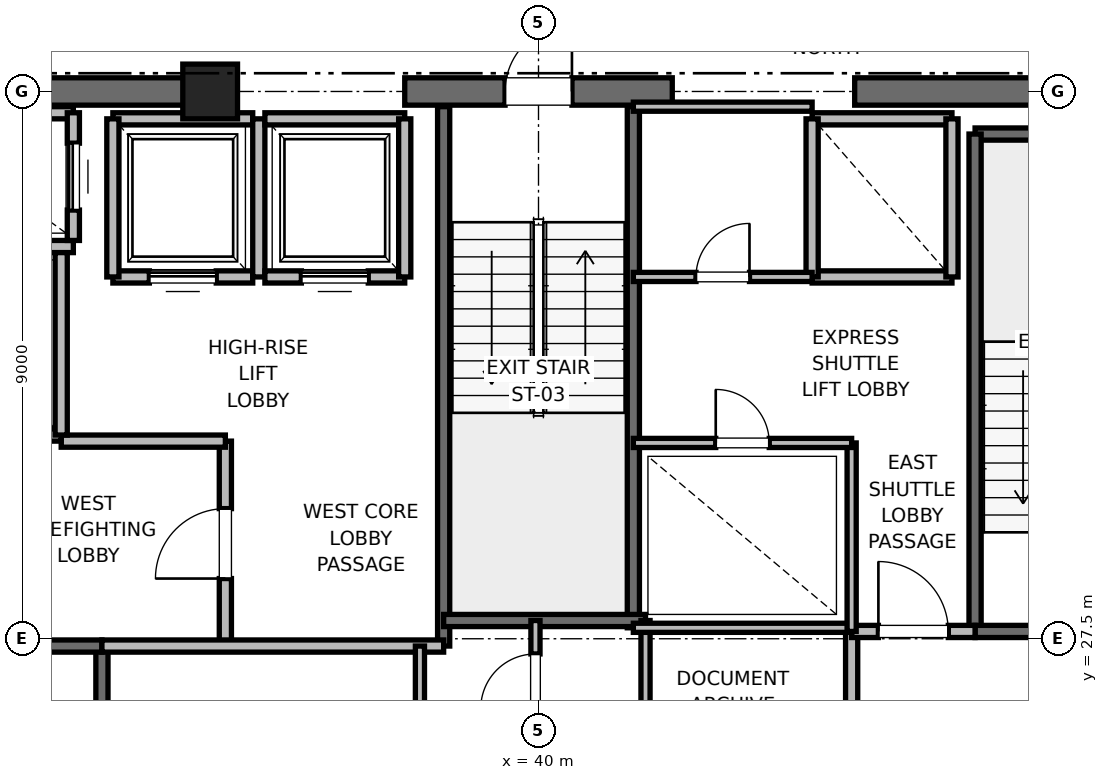
"""IFC4 building model, lengths in metres.
Left out: names, types, materials, properties, quantities, classifications, styles, units other than length and angle.
Written with IfcOpenShell. Run it as: python <this file> out.ifc"""

import sys

from ifc_helpers import new_model, si_unit, direction, frame, frame_2d, origin, origin_2d, place, context, subcontext, project, spatial, rectangle, extrude, element, fill, save


model = new_model("IFC4")
c1 = context("Model", 3, precision=1e-05, world=origin(), true_north=direction((0.0, 1.0)))
c2 = subcontext(c1, "Body", "Model", "MODEL_VIEW")
j1 = project(units=[si_unit("LENGTHUNIT", "METRE"), si_unit("PLANEANGLEUNIT", "RADIAN")], contexts=[c1])
p1 = place(None, origin())
s1 = spatial("IfcSite", under=j1, at=p1, CompositionType="ELEMENT")
p2 = place(p1, origin())
s2 = spatial("IfcBuilding", under=s1, at=p2, CompositionType="ELEMENT")
p3 = place(p2, frame((0.0, 0.0, 251.2)))
s3 = spatial("IfcBuildingStorey", under=s2, at=p3, CompositionType="ELEMENT", Elevation=251.2)
p4 = place(p3, frame((34.6, 36.5, 0.0), z_axis=(0.0, 0.0, 1.0), x_axis=(1.0, 0.0, 0.0)))
e1 = element("IfcColumn", 1, at=p4, inside=s3, PredefinedType="PILASTER", context=c2, shape_type="SweptSolid", body=[
    extrude(rectangle(XDim=0.9, YDim=0.9, at=origin_2d()), origin(), (0.0, 0.0, 1.0), 4.0),
])
p5 = place(p3, frame((29.0, 36.5, 0.0), z_axis=(0.0, 0.0, 1.0), x_axis=(1.0, 0.0, 0.0)))
e2 = element("IfcWall", 2, at=p5, inside=s3, PredefinedType="SHEAR", context=c2, shape_type="SweptSolid", body=[
    extrude(rectangle(XDim=5.8, YDim=0.45, at=frame_2d((2.9, 0.0))), origin(), (0.0, 0.0, 1.0), 3.785),
])
p6 = place(p3, frame((37.8, 36.5, 0.0), z_axis=(0.0, 0.0, 1.0), x_axis=(1.0, 0.0, 0.0)))
e3 = element("IfcWall", 3, at=p6, inside=s3, PredefinedType="SHEAR", context=c2, shape_type="SweptSolid", body=[
    extrude(rectangle(XDim=4.4, YDim=0.45, at=frame_2d((2.2, 0.0))), origin(), (0.0, 0.0, 1.0), 3.785),
])
p7 = place(p6, frame((1.65, 0.0, 0.0)))
e4 = element("IfcOpeningElement", 4, at=p7, cuts=e3, PredefinedType="OPENING", context=c2, shape_type="SweptSolid", body=[
    extrude(rectangle(XDim=1.1, YDim=2.15, at=frame_2d((0.55, 1.075))), frame((0.0, 0.225, 0.0), z_axis=(0.0, -1.0, 0.0), x_axis=(1.0, 0.0, 0.0)), (0.0, 0.0, 1.0), 0.45),
])
p8 = place(p3, frame((45.2, 36.5, 0.0), z_axis=(0.0, 0.0, 1.0), x_axis=(1.0, 0.0, 0.0)))
e5 = element("IfcWall", 5, at=p8, inside=s3, PredefinedType="SHEAR", context=c2, shape_type="SweptSolid", body=[
    extrude(rectangle(XDim=5.8, YDim=0.45, at=frame_2d((2.9, 0.0))), origin(), (0.0, 0.0, 1.0), 3.785),
])
p9 = place(p3, frame((32.82, 18.6, 0.0), z_axis=(0.0, 0.0, 1.0), x_axis=(0.0, 1.0, 0.0)))
e6 = element("IfcWall", 6, at=p9, inside=s3, PredefinedType="SOLIDWALL", context=c2, shape_type="SweptSolid", body=[
    extrude(rectangle(XDim=8.78, YDim=0.2, at=frame_2d((4.39, 0.0))), origin(), (0.0, 0.0, 1.0), 3.785),
])
p10 = place(p3, frame((29.7, 27.38, 0.0), z_axis=(0.0, 0.0, 1.0), x_axis=(1.0, 0.0, 0.0)))
e7 = element("IfcWall", 7, at=p10, inside=s3, PredefinedType="SOLIDWALL", context=c2, shape_type="SweptSolid", body=[
    extrude(rectangle(XDim=3.12, YDim=0.2, at=frame_2d((1.56, 0.0))), origin(), (0.0, 0.0, 1.0), 3.785),
])
p11 = place(p10, frame((1.01, 0.0, 0.0)))
e8 = element("IfcOpeningElement", 8, at=p11, cuts=e7, PredefinedType="OPENING", context=c2, shape_type="SweptSolid", body=[
    extrude(rectangle(XDim=1.1, YDim=2.15, at=frame_2d((0.55, 1.075))), frame((0.0, 0.1, 0.0), z_axis=(0.0, -1.0, 0.0), x_axis=(1.0, 0.0, 0.0)), (0.0, 0.0, 1.0), 0.2),
])
p12 = place(p3, frame((47.18, 35.8, 0.0), z_axis=(0.0, 0.0, 1.0), x_axis=(1.0, 0.0, 0.0)))
e9 = element("IfcWall", 9, at=p12, inside=s3, PredefinedType="SOLIDWALL", context=c2, shape_type="SweptSolid", body=[
    extrude(rectangle(XDim=3.12, YDim=0.2, at=frame_2d((1.56, 0.0))), origin(), (0.0, 0.0, 1.0), 3.785),
])
p13 = place(p3, frame((47.18, 27.62, 0.0), z_axis=(0.0, 0.0, 1.0), x_axis=(0.0, 1.0, 0.0)))
e10 = element("IfcWall", 10, at=p13, inside=s3, PredefinedType="SOLIDWALL", context=c2, shape_type="SweptSolid", body=[
    extrude(rectangle(XDim=8.18, YDim=0.2, at=frame_2d((4.09, 0.0))), origin(), (0.0, 0.0, 1.0), 3.785),
])
p14 = place(p3, frame((47.18, 27.62, 0.0), z_axis=(0.0, 0.0, 1.0), x_axis=(1.0, 0.0, 0.0)))
e11 = element("IfcWall", 11, at=p14, inside=s3, PredefinedType="SOLIDWALL", context=c2, shape_type="SweptSolid", body=[
    extrude(rectangle(XDim=3.12, YDim=0.2, at=frame_2d((1.56, 0.0))), origin(), (0.0, 0.0, 1.0), 3.785),
])
p15 = place(p14, frame((1.01, 0.0, 0.0)))
e12 = element("IfcOpeningElement", 12, at=p15, cuts=e11, PredefinedType="OPENING", context=c2, shape_type="SweptSolid", body=[
    extrude(rectangle(XDim=1.1, YDim=2.15, at=frame_2d((0.55, 1.075))), frame((0.0, 0.1, 0.0), z_axis=(0.0, -1.0, 0.0), x_axis=(1.0, 0.0, 0.0)), (0.0, 0.0, 1.0), 0.2),
])
p16 = place(p3, frame((38.44, 27.38, 0.0), z_axis=(0.0, 0.0, 1.0), x_axis=(0.0, 1.0, 0.0)))
e13 = element("IfcWall", 13, at=p16, inside=s3, PredefinedType="SOLIDWALL", context=c2, shape_type="SweptSolid", body=[
    extrude(rectangle(XDim=8.87, YDim=0.2, at=frame_2d((4.435, 0.0))), origin(), (0.0, 0.0, 1.0), 3.785),
])
p17 = place(p3, frame((41.56, 27.68, 0.0), z_axis=(0.0, 0.0, 1.0), x_axis=(0.0, 1.0, 0.0)))
e14 = element("IfcWall", 14, at=p17, inside=s3, PredefinedType="SOLIDWALL", context=c2, shape_type="SweptSolid", body=[
    extrude(rectangle(XDim=8.57, YDim=0.2, at=frame_2d((4.285, 0.0))), origin(), (0.0, 0.0, 1.0), 3.785),
])
p18 = place(p3, frame((38.44, 27.8, 0.0), z_axis=(0.0, 0.0, 1.0), x_axis=(1.0, 0.0, 0.0)))
e15 = element("IfcWall", 15, at=p18, inside=s3, PredefinedType="SOLIDWALL", context=c2, shape_type="SweptSolid", body=[
    extrude(rectangle(XDim=3.32, YDim=0.2, at=frame_2d((1.66, 0.0))), origin(), (0.0, 0.0, 1.0), 3.785),
])
p19 = place(p3, frame((34.85, 27.38, 0.0), z_axis=(0.0, 0.0, 1.0), x_axis=(0.0, 1.0, 0.0)))
e16 = element("IfcWall", 16, at=p19, inside=s3, PredefinedType="PARTITIONING", context=c2, shape_type="SweptSolid", body=[
    extrude(rectangle(XDim=3.37, YDim=0.2, at=frame_2d((1.685, 0.0))), origin(), (0.0, 0.0, 1.0), 3.785),
])
p20 = place(p19, frame((1.11, 0.0, 0.0)))
e17 = element("IfcOpeningElement", 17, at=p20, cuts=e16, PredefinedType="OPENING", context=c2, shape_type="SweptSolid", body=[
    extrude(rectangle(XDim=1.15, YDim=2.2, at=frame_2d((0.575, 1.1))), frame((0.0, 0.1, 0.0), z_axis=(0.0, -1.0, 0.0), x_axis=(1.0, 0.0, 0.0)), (0.0, 0.0, 1.0), 0.2),
])
p21 = place(p3, frame((32.82, 27.38, 0.0), z_axis=(0.0, 0.0, 1.0), x_axis=(1.0, 0.0, 0.0)))
e18 = element("IfcWall", 18, at=p21, inside=s3, PredefinedType="PARTITIONING", context=c2, shape_type="SweptSolid", body=[
    extrude(rectangle(XDim=5.62, YDim=0.2, at=frame_2d((2.81, 0.0))), origin(), (0.0, 0.0, 1.0), 3.785),
])
p22 = place(p3, frame((32.15, 30.75, 0.0), z_axis=(0.0, 0.0, 1.0), x_axis=(1.0, 0.0, 0.0)))
e19 = element("IfcWall", 19, at=p22, inside=s3, PredefinedType="PARTITIONING", context=c2, shape_type="SweptSolid", body=[
    extrude(rectangle(XDim=2.7, YDim=0.2, at=frame_2d((1.35, 0.0))), origin(), (0.0, 0.0, 1.0), 3.785),
])
p23 = place(p3, frame((45.15, 24.25, 0.0), z_axis=(0.0, 0.0, 1.0), x_axis=(0.0, 1.0, 0.0)))
e20 = element("IfcWall", 20, at=p23, inside=s3, PredefinedType="PARTITIONING", context=c2, shape_type="SweptSolid", body=[
    extrude(rectangle(XDim=3.37, YDim=0.2, at=frame_2d((1.685, 0.0))), origin(), (0.0, 0.0, 1.0), 3.785),
])
p24 = place(p3, frame((45.15, 27.62, 0.0), z_axis=(0.0, 0.0, 1.0), x_axis=(1.0, 0.0, 0.0)))
e21 = element("IfcWall", 21, at=p24, inside=s3, PredefinedType="PARTITIONING", context=c2, shape_type="SweptSolid", body=[
    extrude(rectangle(XDim=2.03, YDim=0.2, at=frame_2d((1.015, 0.0))), origin(), (0.0, 0.0, 1.0), 3.785),
])
p25 = place(p24, frame((0.44, 0.0, 0.0)))
e22 = element("IfcOpeningElement", 22, at=p25, cuts=e21, PredefinedType="OPENING", context=c2, shape_type="SweptSolid", body=[
    extrude(rectangle(XDim=1.15, YDim=2.2, at=frame_2d((0.575, 1.1))), frame((0.0, 0.1, 0.0), z_axis=(0.0, -1.0, 0.0), x_axis=(1.0, 0.0, 0.0)), (0.0, 0.0, 1.0), 0.2),
])
p26 = place(p3, frame((29.55, 30.85, 0.0), z_axis=(0.0, 0.0, 1.0), x_axis=(1.0, 0.0, 0.0)))
e23 = element("IfcWall", 23, at=p26, inside=s3, PredefinedType="SOLIDWALL", context=c2, shape_type="SweptSolid", body=[
    extrude(rectangle(XDim=2.6, YDim=0.2, at=frame_2d((1.3, 0.0))), origin(), (0.0, 0.0, 1.0), 2.865),
])
p27 = place(p26, frame((0.75, 0.0, 0.0)))
e24 = element("IfcOpeningElement", 24, at=p27, cuts=e23, PredefinedType="OPENING", context=c2, shape_type="SweptSolid", body=[
    extrude(rectangle(XDim=1.1, YDim=2.2, at=frame_2d((0.55, 1.1))), frame((0.0, 0.1, 0.0), z_axis=(0.0, -1.0, 0.0), x_axis=(1.0, 0.0, 0.0)), (0.0, 0.0, 1.0), 0.2),
])
p28 = place(p3, frame((29.55, 33.95, 0.0), z_axis=(0.0, 0.0, 1.0), x_axis=(1.0, 0.0, 0.0)))
e25 = element("IfcWall", 25, at=p28, inside=s3, PredefinedType="SOLIDWALL", context=c2, shape_type="SweptSolid", body=[
    extrude(rectangle(XDim=2.8, YDim=0.2, at=frame_2d((1.4, 0.0))), origin(), (0.0, 0.0, 1.0), 3.785),
])
p29 = place(p3, frame((32.15, 30.85, 0.0), z_axis=(0.0, 0.0, 1.0), x_axis=(0.0, 1.0, 0.0)))
e26 = element("IfcWall", 26, at=p29, inside=s3, PredefinedType="SOLIDWALL", context=c2, shape_type="SweptSolid", body=[
    extrude(rectangle(XDim=3.0, YDim=0.2, at=frame_2d((1.5, 0.0))), origin(), (0.0, 0.0, 1.0), 3.785),
])
p30 = place(p3, frame((32.35, 36.15, 0.0), z_axis=(0.0, 0.0, 1.0), x_axis=(-1.0, 0.0, 0.0)))
e27 = element("IfcWall", 27, at=p30, inside=s3, PredefinedType="SOLIDWALL", context=c2, shape_type="SweptSolid", body=[
    extrude(rectangle(XDim=2.8, YDim=0.2, at=frame_2d((1.4, 0.0))), origin(), (0.0, 0.0, 1.0), 3.148),
])
p31 = place(p3, frame((32.35, 34.05, 0.0), z_axis=(0.0, 0.0, 1.0), x_axis=(0.0, 1.0, 0.0)))
e28 = element("IfcWall", 28, at=p31, inside=s3, PredefinedType="SOLIDWALL", context=c2, shape_type="SweptSolid", body=[
    extrude(rectangle(XDim=2.1, YDim=0.2, at=frame_2d((1.05, 0.0))), origin(), (0.0, 0.0, 1.0), 3.785),
])
p32 = place(p31, frame((0.5, 0.0, 0.0)))
e29 = element("IfcOpeningElement", 29, at=p32, cuts=e28, PredefinedType="OPENING", context=c2, shape_type="SweptSolid", body=[
    extrude(rectangle(XDim=1.1, YDim=2.2, at=frame_2d((0.55, 1.1))), frame((0.0, 0.1, 0.0), z_axis=(0.0, -1.0, 0.0), x_axis=(1.0, 0.0, 0.0)), (0.0, 0.0, 1.0), 0.2),
])
p33 = place(p3, frame((33.0, 33.45, 0.0), z_axis=(0.0, 0.0, 1.0), x_axis=(1.0, 0.0, 0.0)))
e30 = element("IfcWall", 30, at=p33, inside=s3, PredefinedType="SOLIDWALL", context=c2, shape_type="SweptSolid", body=[
    extrude(rectangle(XDim=2.3, YDim=0.2, at=frame_2d((1.15, 0.0))), origin(), (0.0, 0.0, 1.0), 3.785),
])
p34 = place(p33, frame((0.6, 0.0, 0.0)))
e31 = element("IfcOpeningElement", 31, at=p34, cuts=e30, PredefinedType="OPENING", context=c2, shape_type="SweptSolid", body=[
    extrude(rectangle(XDim=1.1, YDim=2.2, at=frame_2d((0.55, 1.1))), frame((0.0, 0.1, 0.0), z_axis=(0.0, -1.0, 0.0), x_axis=(1.0, 0.0, 0.0)), (0.0, 0.0, 1.0), 0.2),
])
p35 = place(p3, frame((35.3, 36.05, 0.0), z_axis=(0.0, 0.0, 1.0), x_axis=(-1.0, 0.0, 0.0)))
e32 = element("IfcWall", 32, at=p35, inside=s3, PredefinedType="SOLIDWALL", context=c2, shape_type="SweptSolid", body=[
    extrude(rectangle(XDim=2.3, YDim=0.2, at=frame_2d((1.15, 0.0))), origin(), (0.0, 0.0, 1.0), 2.865),
])
p36 = place(p3, frame((33.0, 36.05, 0.0), z_axis=(0.0, 0.0, 1.0), x_axis=(0.0, -1.0, 0.0)))
e33 = element("IfcWall", 33, at=p36, inside=s3, PredefinedType="SOLIDWALL", context=c2, shape_type="SweptSolid", body=[
    extrude(rectangle(XDim=2.6, YDim=0.2, at=frame_2d((1.3, 0.0))), origin(), (0.0, 0.0, 1.0), 3.785),
])
p37 = place(p3, frame((35.4, 33.45, 0.0), z_axis=(0.0, 0.0, 1.0), x_axis=(0.0, 1.0, 0.0)))
e34 = element("IfcWall", 34, at=p37, inside=s3, PredefinedType="SOLIDWALL", context=c2, shape_type="SweptSolid", body=[
    extrude(rectangle(XDim=2.6, YDim=0.2, at=frame_2d((1.3, 0.0))), origin(), (0.0, 0.0, 1.0), 2.865),
])
p38 = place(p3, frame((35.5, 33.45, 0.0), z_axis=(0.0, 0.0, 1.0), x_axis=(1.0, 0.0, 0.0)))
e35 = element("IfcWall", 35, at=p38, inside=s3, PredefinedType="SOLIDWALL", context=c2, shape_type="SweptSolid", body=[
    extrude(rectangle(XDim=2.3, YDim=0.2, at=frame_2d((1.15, 0.0))), origin(), (0.0, 0.0, 1.0), 3.785),
])
p39 = place(p38, frame((0.6, 0.0, 0.0)))
e36 = element("IfcOpeningElement", 36, at=p39, cuts=e35, PredefinedType="OPENING", context=c2, shape_type="SweptSolid", body=[
    extrude(rectangle(XDim=1.1, YDim=2.2, at=frame_2d((0.55, 1.1))), frame((0.0, 0.1, 0.0), z_axis=(0.0, -1.0, 0.0), x_axis=(1.0, 0.0, 0.0)), (0.0, 0.0, 1.0), 0.2),
])
p40 = place(p3, frame((37.8, 36.05, 0.0), z_axis=(0.0, 0.0, 1.0), x_axis=(-1.0, 0.0, 0.0)))
e37 = element("IfcWall", 37, at=p40, inside=s3, PredefinedType="SOLIDWALL", context=c2, shape_type="SweptSolid", body=[
    extrude(rectangle(XDim=2.3, YDim=0.2, at=frame_2d((1.15, 0.0))), origin(), (0.0, 0.0, 1.0), 2.865),
])
p41 = place(p3, frame((37.8, 33.45, 0.0), z_axis=(0.0, 0.0, 1.0), x_axis=(0.0, 1.0, 0.0)))
e38 = element("IfcWall", 38, at=p41, inside=s3, PredefinedType="SOLIDWALL", context=c2, shape_type="SweptSolid", body=[
    extrude(rectangle(XDim=2.6, YDim=0.2, at=frame_2d((1.3, 0.0))), origin(), (0.0, 0.0, 1.0), 2.865),
])
p42 = place(p3, frame((44.5, 33.45, 0.0), z_axis=(0.0, 0.0, 1.0), x_axis=(1.0, 0.0, 0.0)))
e39 = element("IfcWall", 39, at=p42, inside=s3, PredefinedType="SOLIDWALL", context=c2, shape_type="SweptSolid", body=[
    extrude(rectangle(XDim=2.3, YDim=0.2, at=frame_2d((1.15, 0.0))), origin(), (0.0, 0.0, 1.0), 3.785),
])
p43 = place(p3, frame((46.8, 36.05, 0.0), z_axis=(0.0, 0.0, 1.0), x_axis=(-1.0, 0.0, 0.0)))
e40 = element("IfcWall", 40, at=p43, inside=s3, PredefinedType="SOLIDWALL", context=c2, shape_type="SweptSolid", body=[
    extrude(rectangle(XDim=2.3, YDim=0.2, at=frame_2d((1.15, 0.0))), origin(), (0.0, 0.0, 1.0), 2.865),
])
p44 = place(p3, frame((44.5, 36.05, 0.0), z_axis=(0.0, 0.0, 1.0), x_axis=(0.0, -1.0, 0.0)))
e41 = element("IfcWall", 41, at=p44, inside=s3, PredefinedType="SOLIDWALL", context=c2, shape_type="SweptSolid", body=[
    extrude(rectangle(XDim=2.6, YDim=0.2, at=frame_2d((1.3, 0.0))), origin(), (0.0, 0.0, 1.0), 2.865),
])
p45 = place(p3, frame((46.8, 33.45, 0.0), z_axis=(0.0, 0.0, 1.0), x_axis=(0.0, 1.0, 0.0)))
e42 = element("IfcWall", 42, at=p45, inside=s3, PredefinedType="SOLIDWALL", context=c2, shape_type="SweptSolid", body=[
    extrude(rectangle(XDim=2.6, YDim=0.2, at=frame_2d((1.3, 0.0))), origin(), (0.0, 0.0, 1.0), 3.785),
])
p46 = place(p3, frame((41.76, 23.8, 0.0), z_axis=(0.0, 0.0, 1.0), x_axis=(0.0, 1.0, 0.0)))
e43 = element("IfcWall", 43, at=p46, inside=s3, PredefinedType="PARTITIONING", context=c2, shape_type="SweptSolid", body=[
    extrude(rectangle(XDim=4.0, YDim=0.15, at=frame_2d((2.0, 0.0))), origin(), (0.0, 0.0, 1.0), 2.85),
])
p47 = place(p3, frame((39.95, 25.8, 0.0), z_axis=(0.0, 0.0, 1.0), x_axis=(0.0, 1.0, 0.0)))
e44 = element("IfcWall", 44, at=p47, inside=s3, PredefinedType="PARTITIONING", context=c2, shape_type="SweptSolid", body=[
    extrude(rectangle(XDim=2.0, YDim=0.15, at=frame_2d((1.0, 0.0))), origin(), (0.0, 0.0, 1.0), 2.85),
])
p48 = place(p47, frame((0.55, 0.0, 0.0)))
e45 = element("IfcOpeningElement", 45, at=p48, cuts=e44, PredefinedType="OPENING", context=c2, shape_type="SweptSolid", body=[
    extrude(rectangle(XDim=0.9, YDim=2.1, at=frame_2d((0.45, 1.05))), frame((0.0, 0.075, 0.0), z_axis=(0.0, -1.0, 0.0), x_axis=(1.0, 0.0, 0.0)), (0.0, 0.0, 1.0), 0.15),
])
p49 = place(p3, frame((38.05, 18.6, 0.0), z_axis=(0.0, 0.0, 1.0), x_axis=(0.0, 1.0, 0.0)))
e46 = element("IfcWall", 46, at=p49, inside=s3, PredefinedType="PARTITIONING", context=c2, shape_type="SweptSolid", body=[
    extrude(rectangle(XDim=8.78, YDim=0.15, at=frame_2d((4.39, 0.0))), origin(), (0.0, 0.0, 1.0), 2.85),
])
p50 = place(p49, frame((3.89, 0.0, 0.0)))
e47 = element("IfcOpeningElement", 47, at=p50, cuts=e46, PredefinedType="OPENING", context=c2, shape_type="SweptSolid", body=[
    extrude(rectangle(XDim=1.0, YDim=2.15, at=frame_2d((0.5, 1.075))), frame((0.0, 0.075, 0.0), z_axis=(0.0, -1.0, 0.0), x_axis=(1.0, 0.0, 0.0)), (0.0, 0.0, 1.0), 0.15),
])
p51 = place(p3, frame((41.56, 27.68, 0.0), z_axis=(0.0, 0.0, 1.0), x_axis=(1.0, 0.0, 0.0)))
e48 = element("IfcWall", 48, at=p51, inside=s3, PredefinedType="PARTITIONING", context=c2, shape_type="SweptSolid", body=[
    extrude(rectangle(XDim=3.59, YDim=0.15, at=frame_2d((1.795, 0.0))), origin(), (0.0, 0.0, 1.0), 2.85),
])
p52 = place(p3, frame((45.15, 27.62, 0.0), z_axis=(0.0, 0.0, 1.0), x_axis=(0.0, 1.0, 0.0)))
e49 = element("IfcWall", 49, at=p52, inside=s3, PredefinedType="PARTITIONING", context=c2, shape_type="SweptSolid", body=[
    extrude(rectangle(XDim=3.1, YDim=0.15, at=frame_2d((1.55, 0.0))), origin(), (0.0, 0.0, 1.0), 2.85),
])
p53 = place(p3, frame((41.56, 30.72, 0.0), z_axis=(0.0, 0.0, 1.0), x_axis=(1.0, 0.0, 0.0)))
e50 = element("IfcWall", 50, at=p53, inside=s3, PredefinedType="PARTITIONING", context=c2, shape_type="SweptSolid", body=[
    extrude(rectangle(XDim=3.59, YDim=0.15, at=frame_2d((1.795, 0.0))), origin(), (0.0, 0.0, 1.0), 2.85),
])
p54 = place(p53, frame((1.355, 0.0, 0.0)))
e51 = element("IfcOpeningElement", 51, at=p54, cuts=e50, PredefinedType="OPENING", context=c2, shape_type="SweptSolid", body=[
    extrude(rectangle(XDim=0.88, YDim=2.1, at=frame_2d((0.44, 1.05))), frame((0.0, 0.075, 0.0), z_axis=(0.0, -1.0, 0.0), x_axis=(1.0, 0.0, 0.0)), (0.0, 0.0, 1.0), 0.15),
])
p55 = place(p3, frame((41.56, 36.25, 0.0), z_axis=(0.0, 0.0, 1.0), x_axis=(1.0, 0.0, 0.0)))
e52 = element("IfcWall", 52, at=p55, inside=s3, PredefinedType="PARTITIONING", context=c2, shape_type="SweptSolid", body=[
    extrude(rectangle(XDim=2.94, YDim=0.15, at=frame_2d((1.47, 0.0))), origin(), (0.0, 0.0, 1.0), 2.85),
])
p56 = place(p3, frame((41.56, 33.45, 0.0), z_axis=(0.0, 0.0, 1.0), x_axis=(1.0, 0.0, 0.0)))
e53 = element("IfcWall", 53, at=p56, inside=s3, PredefinedType="PARTITIONING", context=c2, shape_type="SweptSolid", body=[
    extrude(rectangle(XDim=2.94, YDim=0.15, at=frame_2d((1.47, 0.0))), origin(), (0.0, 0.0, 1.0), 2.85),
])
p57 = place(p56, frame((1.03, 0.0, 0.0)))
e54 = element("IfcOpeningElement", 54, at=p57, cuts=e53, PredefinedType="OPENING", context=c2, shape_type="SweptSolid", body=[
    extrude(rectangle(XDim=0.88, YDim=2.1, at=frame_2d((0.44, 1.05))), frame((0.0, 0.075, 0.0), z_axis=(0.0, -1.0, 0.0), x_axis=(1.0, 0.0, 0.0)), (0.0, 0.0, 1.0), 0.15),
])
p58 = place(p7, origin())
e55 = element("IfcDoor", 55, at=p58, inside=s3, OperationType="SINGLE_SWING_RIGHT", PredefinedType="DOOR", context=c2, shape_type="SweptSolid", body=[
    extrude(rectangle(XDim=1.1, YDim=2.15, at=frame_2d((0.55, 1.075))), frame((0.0, 0.025, 0.0), z_axis=(0.0, -1.0, 0.0), x_axis=(1.0, 0.0, 0.0)), (0.0, 0.0, 1.0), 0.05),
])
fill(e4, e55)
p59 = place(p20, origin())
e56 = element("IfcDoor", 56, at=p59, inside=s3, OperationType="SINGLE_SWING_LEFT", PredefinedType="DOOR", context=c2, shape_type="SweptSolid", body=[
    extrude(rectangle(XDim=1.15, YDim=2.2, at=frame_2d((0.575, 1.1))), frame((0.0, 0.025, 0.0), z_axis=(0.0, -1.0, 0.0), x_axis=(1.0, 0.0, 0.0)), (0.0, 0.0, 1.0), 0.05),
])
fill(e17, e56)
p60 = place(p25, origin())
e57 = element("IfcDoor", 57, at=p60, inside=s3, OperationType="SINGLE_SWING_LEFT", PredefinedType="DOOR", context=c2, shape_type="SweptSolid", body=[
    extrude(rectangle(XDim=1.15, YDim=2.2, at=frame_2d((0.575, 1.1))), frame((0.0, 0.025, 0.0), z_axis=(0.0, -1.0, 0.0), x_axis=(1.0, 0.0, 0.0)), (0.0, 0.0, 1.0), 0.05),
])
fill(e22, e57)
p61 = place(p32, origin())
e58 = element("IfcDoor", 58, at=p61, inside=s3, OperationType="SLIDING_TO_RIGHT", PredefinedType="DOOR", context=c2, shape_type="SweptSolid", body=[
    extrude(rectangle(XDim=1.1, YDim=2.2, at=frame_2d((0.55, 1.1))), frame((0.0, 0.025, 0.0), z_axis=(0.0, -1.0, 0.0), x_axis=(1.0, 0.0, 0.0)), (0.0, 0.0, 1.0), 0.05),
])
fill(e29, e58)
p62 = place(p34, origin())
e59 = element("IfcDoor", 59, at=p62, inside=s3, OperationType="SLIDING_TO_RIGHT", PredefinedType="DOOR", context=c2, shape_type="SweptSolid", body=[
    extrude(rectangle(XDim=1.1, YDim=2.2, at=frame_2d((0.55, 1.1))), frame((0.0, 0.025, 0.0), z_axis=(0.0, -1.0, 0.0), x_axis=(1.0, 0.0, 0.0)), (0.0, 0.0, 1.0), 0.05),
])
fill(e31, e59)
p63 = place(p39, origin())
e60 = element("IfcDoor", 60, at=p63, inside=s3, OperationType="SLIDING_TO_RIGHT", PredefinedType="DOOR", context=c2, shape_type="SweptSolid", body=[
    extrude(rectangle(XDim=1.1, YDim=2.2, at=frame_2d((0.55, 1.1))), frame((0.0, 0.025, 0.0), z_axis=(0.0, -1.0, 0.0), x_axis=(1.0, 0.0, 0.0)), (0.0, 0.0, 1.0), 0.05),
])
fill(e36, e60)
p64 = place(p48, origin())
e61 = element("IfcDoor", 61, at=p64, inside=s3, OperationType="SINGLE_SWING_LEFT", PredefinedType="DOOR", context=c2, shape_type="SweptSolid", body=[
    extrude(rectangle(XDim=0.9, YDim=2.1, at=frame_2d((0.45, 1.05))), frame((0.0, 0.025, 0.0), z_axis=(0.0, -1.0, 0.0), x_axis=(1.0, 0.0, 0.0)), (0.0, 0.0, 1.0), 0.05),
])
fill(e45, e61)
p65 = place(p54, origin())
e62 = element("IfcDoor", 62, at=p65, inside=s3, OperationType="SINGLE_SWING_LEFT", PredefinedType="DOOR", context=c2, shape_type="SweptSolid", body=[
    extrude(rectangle(XDim=0.88, YDim=2.1, at=frame_2d((0.44, 1.05))), frame((0.0, 0.025, 0.0), z_axis=(0.0, -1.0, 0.0), x_axis=(1.0, 0.0, 0.0)), (0.0, 0.0, 1.0), 0.05),
])
fill(e51, e62)
p66 = place(p57, origin())
e63 = element("IfcDoor", 63, at=p66, inside=s3, OperationType="SINGLE_SWING_RIGHT", PredefinedType="DOOR", context=c2, shape_type="SweptSolid", body=[
    extrude(rectangle(XDim=0.88, YDim=2.1, at=frame_2d((0.44, 1.05))), frame((0.0, 0.025, 0.0), z_axis=(0.0, -1.0, 0.0), x_axis=(1.0, 0.0, 0.0)), (0.0, 0.0, 1.0), 0.05),
])
fill(e54, e63)
save(model, sys.argv[1])
